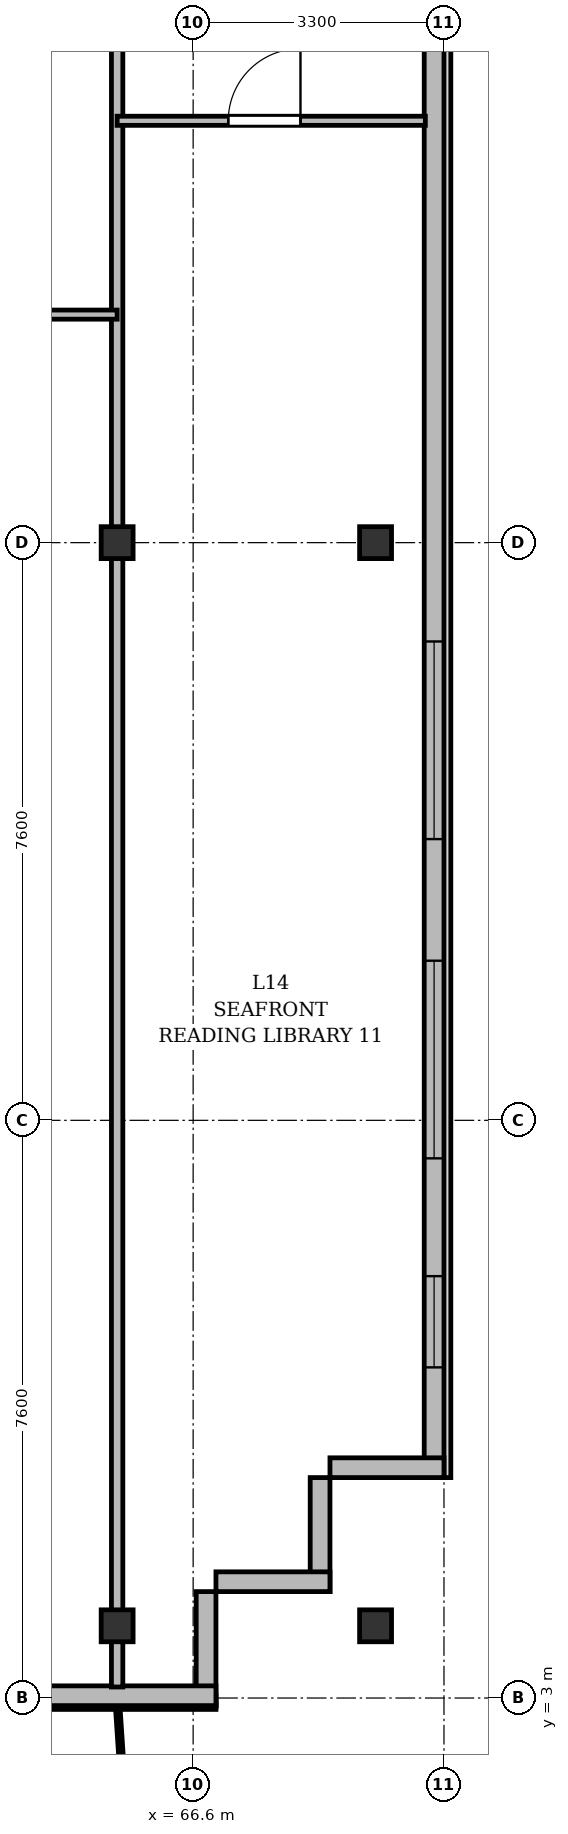
"""IFC4 building model, lengths in metres.
Left out: names, types, materials, properties, quantities, classifications, styles, units other than length and angle.
Written with IfcOpenShell. Run it as: python <this file> out.ifc"""

import sys

from ifc_helpers import new_model, si_unit, direction, frame, frame_2d, origin, origin_2d, place, context, subcontext, project, spatial, rectangle, i_section, extrude, source, transform, mapped, element, fill, save


model = new_model("IFC4")
c1 = context("Model", 3, precision=1e-05, world=origin(), true_north=direction((0.0, 1.0)))
c2 = subcontext(c1, "Body", "Model", "MODEL_VIEW")
j1 = project(units=[si_unit("LENGTHUNIT", "METRE"), si_unit("PLANEANGLEUNIT", "RADIAN")], contexts=[c1])
p1 = place(None, origin())
s1 = spatial("IfcSite", under=j1, at=p1, CompositionType="ELEMENT")
p2 = place(p1, origin())
s2 = spatial("IfcBuilding", under=s1, at=p2, CompositionType="ELEMENT")
p3 = place(p2, frame((0.0, 0.0, 55.9)))
s3 = spatial("IfcBuildingStorey", under=s2, at=p3, CompositionType="ELEMENT", Elevation=55.9)
m1 = source(origin(), c2, "Body", "SweptSolid", [
    extrude(i_section(OverallWidth=0.42, OverallDepth=0.42, WebThickness=0.026, FlangeThickness=0.04, at=origin_2d()), origin(), (0.0, 0.0, 1.0), 3.6),
])
for number, where, z_axis, x_axis in (
    (1, (65.6, 3.95, 0.0), (0.0, 0.0, 1.0), (1.0, 0.0, 0.0)),
    (2, (65.6, 18.2, 0.0), (0.0, 0.0, 1.0), (1.0, 0.0, 0.0)),
    (3, (69.0, 3.95, 0.0), (0.0, 0.0, 1.0), (1.0, 0.0, 0.0)),
    (4, (69.0, 18.2, 0.0), (0.0, 0.0, 1.0), (1.0, 0.0, 0.0)),
):
    element("IfcColumn", number, at=place(p3, frame(where, z_axis=z_axis, x_axis=x_axis)), inside=s3, PredefinedType="COLUMN", context=c2, shape_type="MappedRepresentation", body=[
        mapped(m1, transform((0.0, 0.0, 0.0), x_axis=(1.0, 0.0, 0.0), y_axis=(0.0, 1.0, 0.0), z_axis=(0.0, 0.0, 1.0), scale=1.0)),
    ])
p4 = place(p3, frame((69.77, 45.5, 0.0), z_axis=(0.0, 0.0, 1.0), x_axis=(0.0, -1.0, 0.0)))
e5 = element("IfcWall", 5, at=p4, inside=s3, PredefinedType="SOLIDWALL", context=c2, shape_type="SweptSolid", body=[
    extrude(rectangle(XDim=39.6, YDim=0.26, at=frame_2d((19.8, 0.0))), origin(), (0.0, 0.0, 1.0), 3.34),
])
p5 = place(p4, frame((36.95, 0.0, 0.92)))
e6 = element("IfcOpeningElement", 6, at=p5, cuts=e5, PredefinedType="OPENING", context=c2, shape_type="SweptSolid", body=[
    extrude(rectangle(XDim=1.2, YDim=1.65, at=frame_2d((0.6, 0.825))), frame((0.0, 0.14, 0.0), z_axis=(0.0, -1.0, 0.0), x_axis=(1.0, 0.0, 0.0)), (0.0, 0.0, 1.0), 0.28),
])
p6 = place(p4, frame((32.8, 0.0, 0.92)))
e7 = element("IfcOpeningElement", 7, at=p6, cuts=e5, PredefinedType="OPENING", context=c2, shape_type="SweptSolid", body=[
    extrude(rectangle(XDim=2.6, YDim=1.9, at=frame_2d((1.3, 0.95))), frame((0.0, 0.14, 0.0), z_axis=(0.0, -1.0, 0.0), x_axis=(1.0, 0.0, 0.0)), (0.0, 0.0, 1.0), 0.28),
])
p7 = place(p4, frame((28.6, 0.0, 0.92)))
e8 = element("IfcOpeningElement", 8, at=p7, cuts=e5, PredefinedType="OPENING", context=c2, shape_type="SweptSolid", body=[
    extrude(rectangle(XDim=2.6, YDim=1.9, at=frame_2d((1.3, 0.95))), frame((0.0, 0.14, 0.0), z_axis=(0.0, -1.0, 0.0), x_axis=(1.0, 0.0, 0.0)), (0.0, 0.0, 1.0), 0.28),
])
p8 = place(p4, frame((7.4, 0.0, 0.92)))
e9 = element("IfcOpeningElement", 9, at=p8, cuts=e5, PredefinedType="OPENING", context=c2, shape_type="SweptSolid", body=[
    extrude(rectangle(XDim=2.6, YDim=1.9, at=frame_2d((1.3, 0.95))), frame((0.0, 0.14, 0.0), z_axis=(0.0, -1.0, 0.0), x_axis=(1.0, 0.0, 0.0)), (0.0, 0.0, 1.0), 0.28),
])
p9 = place(p4, frame((4.5, 0.0, 0.92)))
e10 = element("IfcOpeningElement", 10, at=p9, cuts=e5, PredefinedType="OPENING", context=c2, shape_type="SweptSolid", body=[
    extrude(rectangle(XDim=1.2, YDim=1.65, at=frame_2d((0.6, 0.825))), frame((0.0, 0.14, 0.0), z_axis=(0.0, -1.0, 0.0), x_axis=(1.0, 0.0, 0.0)), (0.0, 0.0, 1.0), 0.28),
])
p10 = place(p4, frame((1.15, 0.0, 0.92)))
e11 = element("IfcOpeningElement", 11, at=p10, cuts=e5, PredefinedType="OPENING", context=c2, shape_type="SweptSolid", body=[
    extrude(rectangle(XDim=1.2, YDim=1.65, at=frame_2d((0.6, 0.825))), frame((0.0, 0.14, 0.0), z_axis=(0.0, -1.0, 0.0), x_axis=(1.0, 0.0, 0.0)), (0.0, 0.0, 1.0), 0.28),
])
p11 = place(p3, frame((69.9, 6.03, 0.0), z_axis=(0.0, 0.0, 1.0), x_axis=(-1.0, 0.0, 0.0)))
e12 = element("IfcWall", 12, at=p11, inside=s3, PredefinedType="SOLIDWALL", context=c2, shape_type="SweptSolid", body=[
    extrude(rectangle(XDim=1.5, YDim=0.26, at=frame_2d((0.75, 0.0))), origin(), (0.0, 0.0, 1.0), 2.752),
])
for number, where, z_axis, x_axis in (
    (13, (68.27, 5.9, 0.0), (0.0, 0.0, 1.0), (0.0, -1.0, 0.0)),
    (14, (68.4, 4.53, 0.0), (0.0, 0.0, 1.0), (-1.0, 0.0, 0.0)),
):
    element("IfcWall", number, at=place(p3, frame(where, z_axis=z_axis, x_axis=x_axis)), inside=s3, PredefinedType="SOLIDWALL", context=c2, shape_type="SweptSolid", body=[
        extrude(rectangle(XDim=1.5, YDim=0.26, at=frame_2d((0.75, 0.0))), origin(), (0.0, 0.0, 1.0), 3.34),
    ])
p12 = place(p3, frame((66.77, 4.4, 0.0), z_axis=(0.0, 0.0, 1.0), x_axis=(0.0, -1.0, 0.0)))
e15 = element("IfcWall", 15, at=p12, inside=s3, PredefinedType="SOLIDWALL", context=c2, shape_type="SweptSolid", body=[
    extrude(rectangle(XDim=1.5, YDim=0.26, at=frame_2d((0.75, 0.0))), origin(), (0.0, 0.0, 1.0), 2.69),
])
p13 = place(p3, frame((66.9, 3.03, 0.0), z_axis=(0.0, 0.0, 1.0), x_axis=(-1.0, 0.0, 0.0)))
e16 = element("IfcWall", 16, at=p13, inside=s3, PredefinedType="SOLIDWALL", context=c2, shape_type="SweptSolid", body=[
    extrude(rectangle(XDim=59.4, YDim=0.26, at=frame_2d((29.7, 0.0))), origin(), (0.0, 0.0, 1.0), 3.34),
])
p14 = place(p13, frame((3.8, 0.0, 0.9)))
e17 = element("IfcOpeningElement", 17, at=p14, cuts=e16, PredefinedType="OPENING", context=c2, shape_type="SweptSolid", body=[
    extrude(rectangle(XDim=1.8, YDim=1.8, at=frame_2d((0.9, 0.9))), frame((0.0, 0.14, 0.0), z_axis=(0.0, -1.0, 0.0), x_axis=(1.0, 0.0, 0.0)), (0.0, 0.0, 1.0), 0.28),
])
p15 = place(p13, frame((9.18, 0.0, 0.0)))
e18 = element("IfcOpeningElement", 18, at=p15, cuts=e16, PredefinedType="OPENING", context=c2, shape_type="SweptSolid", body=[
    extrude(rectangle(XDim=1.2, YDim=2.2, at=frame_2d((0.6, 1.1))), frame((0.0, 0.14, 0.0), z_axis=(0.0, -1.0, 0.0), x_axis=(1.0, 0.0, 0.0)), (0.0, 0.0, 1.0), 0.28),
])
p16 = place(p13, frame((13.2, 0.0, 0.9)))
e19 = element("IfcOpeningElement", 19, at=p16, cuts=e16, PredefinedType="OPENING", context=c2, shape_type="SweptSolid", body=[
    extrude(rectangle(XDim=1.5, YDim=1.75, at=frame_2d((0.75, 0.875))), frame((0.0, 0.14, 0.0), z_axis=(0.0, -1.0, 0.0), x_axis=(1.0, 0.0, 0.0)), (0.0, 0.0, 1.0), 0.28),
])
p17 = place(p13, frame((18.5, 0.0, 0.9)))
e20 = element("IfcOpeningElement", 20, at=p17, cuts=e16, PredefinedType="OPENING", context=c2, shape_type="SweptSolid", body=[
    extrude(rectangle(XDim=2.0, YDim=1.95, at=frame_2d((1.0, 0.975))), frame((0.0, 0.14, 0.0), z_axis=(0.0, -1.0, 0.0), x_axis=(1.0, 0.0, 0.0)), (0.0, 0.0, 1.0), 0.28),
])
p18 = place(p13, frame((24.175, 0.0, 0.9)))
e21 = element("IfcOpeningElement", 21, at=p18, cuts=e16, PredefinedType="OPENING", context=c2, shape_type="SweptSolid", body=[
    extrude(rectangle(XDim=1.65, YDim=1.85, at=frame_2d((0.825, 0.925))), frame((0.0, 0.14, 0.0), z_axis=(0.0, -1.0, 0.0), x_axis=(1.0, 0.0, 0.0)), (0.0, 0.0, 1.0), 0.28),
])
p19 = place(p13, frame((28.3, 0.0, 0.9)))
e22 = element("IfcOpeningElement", 22, at=p19, cuts=e16, PredefinedType="OPENING", context=c2, shape_type="SweptSolid", body=[
    extrude(rectangle(XDim=1.8, YDim=1.8, at=frame_2d((0.9, 0.9))), frame((0.0, 0.14, 0.0), z_axis=(0.0, -1.0, 0.0), x_axis=(1.0, 0.0, 0.0)), (0.0, 0.0, 1.0), 0.28),
])
p20 = place(p13, frame((32.8, 0.0, 0.9)))
e23 = element("IfcOpeningElement", 23, at=p20, cuts=e16, PredefinedType="OPENING", context=c2, shape_type="SweptSolid", body=[
    extrude(rectangle(XDim=2.2, YDim=1.8, at=frame_2d((1.1, 0.9))), frame((0.0, 0.14, 0.0), z_axis=(0.0, -1.0, 0.0), x_axis=(1.0, 0.0, 0.0)), (0.0, 0.0, 1.0), 0.28),
])
p21 = place(p13, frame((40.301, 0.0, 0.0)))
e24 = element("IfcOpeningElement", 24, at=p21, cuts=e16, PredefinedType="OPENING", context=c2, shape_type="SweptSolid", body=[
    extrude(rectangle(XDim=1.2, YDim=2.2, at=frame_2d((0.6, 1.1))), frame((0.0, 0.14, 0.0), z_axis=(0.0, -1.0, 0.0), x_axis=(1.0, 0.0, 0.0)), (0.0, 0.0, 1.0), 0.28),
])
p22 = place(p13, frame((46.4, 0.0, 0.9)))
e25 = element("IfcOpeningElement", 25, at=p22, cuts=e16, PredefinedType="OPENING", context=c2, shape_type="SweptSolid", body=[
    extrude(rectangle(XDim=2.0, YDim=1.95, at=frame_2d((1.0, 0.975))), frame((0.0, 0.14, 0.0), z_axis=(0.0, -1.0, 0.0), x_axis=(1.0, 0.0, 0.0)), (0.0, 0.0, 1.0), 0.28),
])
p23 = place(p13, frame((53.136, 0.0, 0.0)))
e26 = element("IfcOpeningElement", 26, at=p23, cuts=e16, PredefinedType="OPENING", context=c2, shape_type="SweptSolid", body=[
    extrude(rectangle(XDim=1.2, YDim=2.2, at=frame_2d((0.6, 1.1))), frame((0.0, 0.14, 0.0), z_axis=(0.0, -1.0, 0.0), x_axis=(1.0, 0.0, 0.0)), (0.0, 0.0, 1.0), 0.28),
])
p24 = place(p13, frame((55.5, 0.0, 0.9)))
e27 = element("IfcOpeningElement", 27, at=p24, cuts=e16, PredefinedType="OPENING", context=c2, shape_type="SweptSolid", body=[
    extrude(rectangle(XDim=1.8, YDim=1.8, at=frame_2d((0.9, 0.9))), frame((0.0, 0.14, 0.0), z_axis=(0.0, -1.0, 0.0), x_axis=(1.0, 0.0, 0.0)), (0.0, 0.0, 1.0), 0.28),
])
p25 = place(p3, frame((65.6, 3.145, 0.0), z_axis=(0.0, 0.0, 1.0), x_axis=(0.0, 1.0, 0.0)))
e28 = element("IfcWall", 28, at=p25, inside=s3, PredefinedType="PARTITIONING", context=c2, shape_type="SweptSolid", body=[
    extrude(rectangle(XDim=24.455, YDim=0.15, at=frame_2d((12.228, 0.0))), origin(), (0.0, 0.0, 1.0), 2.752),
])
p26 = place(p3, frame((58.8, 21.2, 0.0), z_axis=(0.0, 0.0, 1.0), x_axis=(1.0, 0.0, 0.0)))
e29 = element("IfcWall", 29, at=p26, inside=s3, PredefinedType="PARTITIONING", context=c2, shape_type="SweptSolid", body=[
    extrude(rectangle(XDim=6.8, YDim=0.12, at=frame_2d((3.4, 0.0))), origin(), (0.0, 0.0, 1.0), 2.752),
])
p27 = place(p26, frame((2.925, 0.0, 0.0)))
e30 = element("IfcOpeningElement", 30, at=p27, cuts=e29, PredefinedType="OPENING", context=c2, shape_type="SweptSolid", body=[
    extrude(rectangle(XDim=0.95, YDim=2.15, at=frame_2d((0.475, 1.075))), frame((0.0, 0.07, 0.0), z_axis=(0.0, -1.0, 0.0), x_axis=(1.0, 0.0, 0.0)), (0.0, 0.0, 1.0), 0.14),
])
p28 = place(p3, frame((65.6, 23.75, 0.0), z_axis=(0.0, 0.0, 1.0), x_axis=(1.0, 0.0, 0.0)))
e31 = element("IfcWall", 31, at=p28, inside=s3, PredefinedType="PARTITIONING", context=c2, shape_type="SweptSolid", body=[
    extrude(rectangle(XDim=4.055, YDim=0.12, at=frame_2d((2.027, 0.0))), origin(), (0.0, 0.0, 1.0), 2.752),
])
p29 = place(p28, frame((1.462, 0.0, 0.0)))
e32 = element("IfcOpeningElement", 32, at=p29, cuts=e31, PredefinedType="OPENING", context=c2, shape_type="SweptSolid", body=[
    extrude(rectangle(XDim=0.95, YDim=2.15, at=frame_2d((0.475, 1.075))), frame((0.0, 0.07, 0.0), z_axis=(0.0, -1.0, 0.0), x_axis=(1.0, 0.0, 0.0)), (0.0, 0.0, 1.0), 0.14),
])
m2 = source(origin(), c2, "Body", "SweptSolid", [
    extrude(rectangle(XDim=1.2, YDim=1.65, at=frame_2d((0.6, 0.825))), frame((0.0, 0.03, 0.0), z_axis=(0.0, -1.0, 0.0), x_axis=(1.0, 0.0, 0.0)), (0.0, 0.0, 1.0), 0.06),
])
p30 = place(p5, origin())
e33 = element("IfcWindow", 33, at=p30, inside=s3, PartitioningType="SINGLE_PANEL", PredefinedType="WINDOW", context=c2, shape_type="MappedRepresentation", body=[
    mapped(m2, transform((0.0, 0.0, 0.0), x_axis=(1.0, 0.0, 0.0), y_axis=(0.0, 1.0, 0.0), z_axis=(0.0, 0.0, 1.0), scale=1.0)),
])
fill(e6, e33)
m3 = source(origin(), c2, "Body", "SweptSolid", [
    extrude(rectangle(XDim=2.6, YDim=1.9, at=frame_2d((1.3, 0.95))), frame((0.0, 0.03, 0.0), z_axis=(0.0, -1.0, 0.0), x_axis=(1.0, 0.0, 0.0)), (0.0, 0.0, 1.0), 0.06),
])
p31 = place(p6, origin())
e34 = element("IfcWindow", 34, at=p31, inside=s3, PartitioningType="SINGLE_PANEL", PredefinedType="WINDOW", context=c2, shape_type="MappedRepresentation", body=[
    mapped(m3, transform((0.0, 0.0, 0.0), x_axis=(1.0, 0.0, 0.0), y_axis=(0.0, 1.0, 0.0), z_axis=(0.0, 0.0, 1.0), scale=1.0)),
])
fill(e7, e34)
p32 = place(p7, origin())
e35 = element("IfcWindow", 35, at=p32, inside=s3, PartitioningType="SINGLE_PANEL", PredefinedType="WINDOW", context=c2, shape_type="MappedRepresentation", body=[
    mapped(m3, transform((0.0, 0.0, 0.0), x_axis=(1.0, 0.0, 0.0), y_axis=(0.0, 1.0, 0.0), z_axis=(0.0, 0.0, 1.0), scale=1.0)),
])
fill(e8, e35)
m4 = source(origin(), c2, "Body", "SweptSolid", [
    extrude(rectangle(XDim=0.95, YDim=2.15, at=frame_2d((0.475, 1.075))), frame((0.0, 0.025, 0.0), z_axis=(0.0, -1.0, 0.0), x_axis=(1.0, 0.0, 0.0)), (0.0, 0.0, 1.0), 0.05),
])
p33 = place(p29, origin())
e36 = element("IfcDoor", 36, at=p33, inside=s3, OperationType="SINGLE_SWING_RIGHT", PredefinedType="DOOR", context=c2, shape_type="MappedRepresentation", body=[
    mapped(m4, transform((0.0, 0.0, 0.0), x_axis=(1.0, 0.0, 0.0), y_axis=(0.0, 1.0, 0.0), z_axis=(0.0, 0.0, 1.0), scale=1.0)),
])
fill(e32, e36)
save(model, sys.argv[1])
